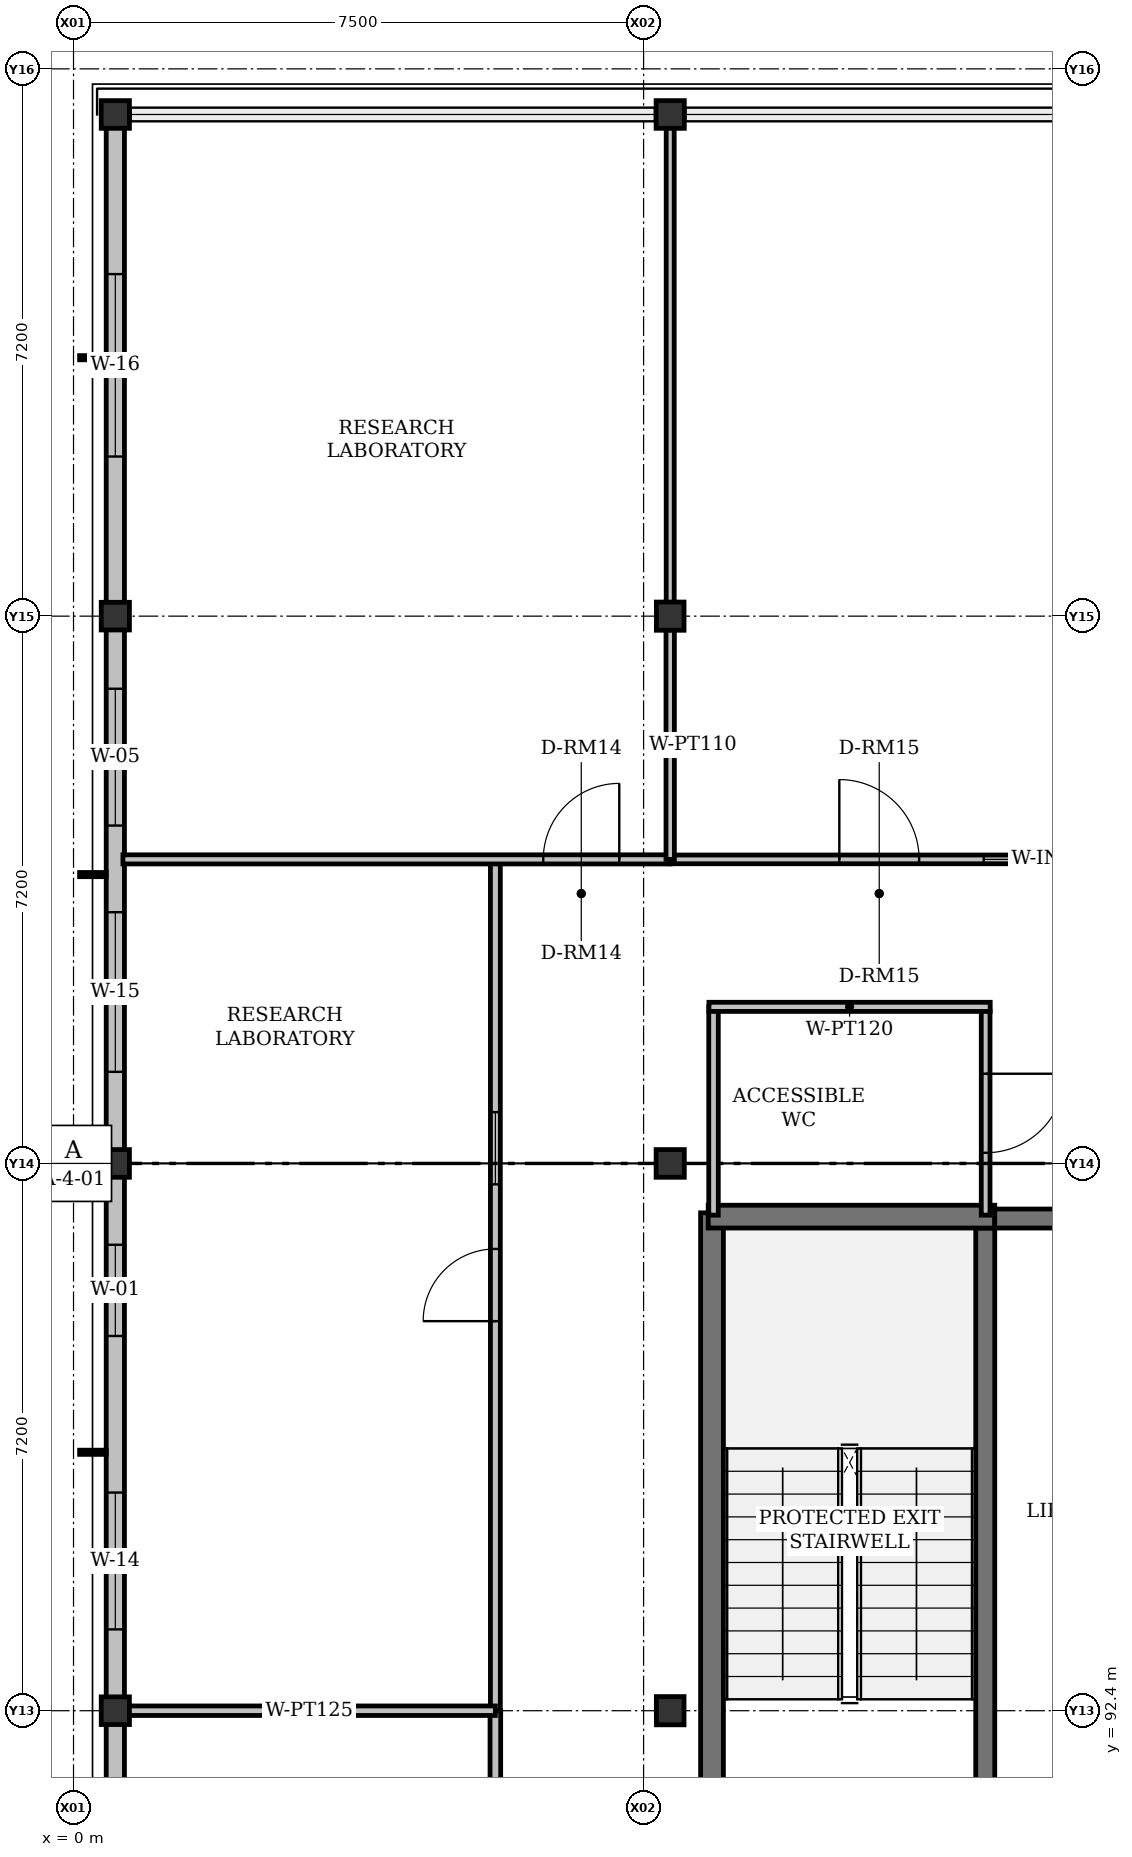
"""IFC4 building model, lengths in metres.
Left out: names, types, materials, properties, quantities, classifications, styles, units other than length and angle.
Written with IfcOpenShell. Run it as: python <this file> out.ifc"""

import sys

from ifc_helpers import new_model, si_unit, direction, frame, frame_2d, origin, origin_2d, place, context, subcontext, project, spatial, rectangle, i_section, extrude, element, fill, save


model = new_model("IFC4")
c1 = context("Model", 3, precision=1e-05, world=origin(), true_north=direction((0.0, 1.0)))
c2 = subcontext(c1, "Body", "Model", "MODEL_VIEW")
j1 = project(units=[si_unit("LENGTHUNIT", "METRE"), si_unit("PLANEANGLEUNIT", "RADIAN")], contexts=[c1])
p1 = place(None, origin())
s1 = spatial("IfcSite", under=j1, at=p1, CompositionType="ELEMENT")
p2 = place(p1, origin())
s2 = spatial("IfcBuilding", under=s1, at=p2, CompositionType="ELEMENT")
p3 = place(p2, frame((0.0, 0.0, 43.5)))
s3 = spatial("IfcBuildingStorey", under=s2, at=p3, CompositionType="ELEMENT", Elevation=43.5)
for number, where, z_axis, x_axis in (
    (1, (0.55, 92.4, 0.0), (0.0, 0.0, 1.0), (1.0, 0.0, 0.0)),
    (2, (7.85, 92.4, 0.0), (0.0, 0.0, 1.0), (0.0, 1.0, 0.0)),
    (3, (0.55, 99.6, 0.0), (0.0, 0.0, 1.0), (1.0, 0.0, 0.0)),
    (4, (7.85, 99.6, 0.0), (0.0, 0.0, 1.0), (1.0, 0.0, 0.0)),
    (5, (0.55, 106.8, 0.0), (0.0, 0.0, 1.0), (1.0, 0.0, 0.0)),
    (6, (7.85, 106.8, 0.0), (0.0, 0.0, 1.0), (0.0, 1.0, 0.0)),
    (7, (0.55, 113.4, 0.0), (0.0, 0.0, 1.0), (1.0, 0.0, 0.0)),
    (8, (7.85, 113.4, 0.0), (0.0, 0.0, 1.0), (1.0, 0.0, 0.0)),
):
    element("IfcColumn", number, at=place(p3, frame(where, z_axis=z_axis, x_axis=x_axis)), inside=s3, PredefinedType="COLUMN", context=c2, shape_type="SweptSolid", body=[
        extrude(i_section(OverallWidth=0.371, OverallDepth=0.364, WebThickness=0.013, FlangeThickness=0.022, FilletRadius=0.015, at=origin_2d()), origin(), (0.0, 0.0, 1.0), 4.2),
    ])
p4 = place(p3, frame((0.55, 85.2, 0.0), z_axis=(0.0, 0.0, 1.0), x_axis=(0.0, 1.0, 0.0)))
e9 = element("IfcWall", 9, at=p4, inside=s3, PredefinedType="SOLIDWALL", context=c2, shape_type="SweptSolid", body=[
    extrude(rectangle(XDim=7.2, YDim=0.24, at=frame_2d((3.6, 0.0))), origin(), (0.0, 0.0, 1.0), 3.552),
])
p5 = place(p4, frame((1.07, 0.0, 0.92)))
e10 = element("IfcOpeningElement", 10, at=p5, cuts=e9, PredefinedType="OPENING", context=c2, shape_type="SweptSolid", body=[
    extrude(rectangle(XDim=1.5, YDim=1.7, at=frame_2d((0.75, 0.85))), frame((0.0, 0.12, 0.0), z_axis=(0.0, -1.0, 0.0), x_axis=(1.0, 0.0, 0.0)), (0.0, 0.0, 1.0), 0.24),
])
p6 = place(p4, frame((4.13, 0.0, 0.92)))
e11 = element("IfcOpeningElement", 11, at=p6, cuts=e9, PredefinedType="OPENING", context=c2, shape_type="SweptSolid", body=[
    extrude(rectangle(XDim=2.0, YDim=1.35, at=frame_2d((1.0, 0.675))), frame((0.0, 0.12, 0.0), z_axis=(0.0, -1.0, 0.0), x_axis=(1.0, 0.0, 0.0)), (0.0, 0.0, 1.0), 0.24),
])
p7 = place(p3, frame((0.55, 92.4, 0.0), z_axis=(0.0, 0.0, 1.0), x_axis=(0.0, 1.0, 0.0)))
e12 = element("IfcWall", 12, at=p7, inside=s3, PredefinedType="SOLIDWALL", context=c2, shape_type="SweptSolid", body=[
    extrude(rectangle(XDim=7.2, YDim=0.24, at=frame_2d((3.6, 0.0))), origin(), (0.0, 0.0, 1.0), 3.552),
])
p8 = place(p7, frame((1.07, 0.0, 0.92)))
e13 = element("IfcOpeningElement", 13, at=p8, cuts=e12, PredefinedType="OPENING", context=c2, shape_type="SweptSolid", body=[
    extrude(rectangle(XDim=1.8, YDim=1.7, at=frame_2d((0.9, 0.85))), frame((0.0, 0.12, 0.0), z_axis=(0.0, -1.0, 0.0), x_axis=(1.0, 0.0, 0.0)), (0.0, 0.0, 1.0), 0.24),
])
p9 = place(p7, frame((4.93, 0.0, 0.92)))
e14 = element("IfcOpeningElement", 14, at=p9, cuts=e12, PredefinedType="OPENING", context=c2, shape_type="SweptSolid", body=[
    extrude(rectangle(XDim=1.2, YDim=1.4, at=frame_2d((0.6, 0.7))), frame((0.0, 0.12, 0.0), z_axis=(0.0, -1.0, 0.0), x_axis=(1.0, 0.0, 0.0)), (0.0, 0.0, 1.0), 0.24),
])
p10 = place(p3, frame((0.55, 99.6, 0.0), z_axis=(0.0, 0.0, 1.0), x_axis=(0.0, 1.0, 0.0)))
e15 = element("IfcWall", 15, at=p10, inside=s3, PredefinedType="SOLIDWALL", context=c2, shape_type="SweptSolid", body=[
    extrude(rectangle(XDim=7.2, YDim=0.24, at=frame_2d((3.6, 0.0))), origin(), (0.0, 0.0, 1.0), 3.552),
])
p11 = place(p10, frame((1.205, 0.0, 0.92)))
e16 = element("IfcOpeningElement", 16, at=p11, cuts=e15, PredefinedType="OPENING", context=c2, shape_type="SweptSolid", body=[
    extrude(rectangle(XDim=2.1, YDim=1.7, at=frame_2d((1.05, 0.85))), frame((0.0, 0.12, 0.0), z_axis=(0.0, -1.0, 0.0), x_axis=(1.0, 0.0, 0.0)), (0.0, 0.0, 1.0), 0.24),
])
p12 = place(p10, frame((4.445, 0.0, 0.92)))
e17 = element("IfcOpeningElement", 17, at=p12, cuts=e15, PredefinedType="OPENING", context=c2, shape_type="SweptSolid", body=[
    extrude(rectangle(XDim=1.8, YDim=1.4, at=frame_2d((0.9, 0.7))), frame((0.0, 0.12, 0.0), z_axis=(0.0, -1.0, 0.0), x_axis=(1.0, 0.0, 0.0)), (0.0, 0.0, 1.0), 0.24),
])
p13 = place(p3, frame((0.55, 106.8, 0.0), z_axis=(0.0, 0.0, 1.0), x_axis=(0.0, 1.0, 0.0)))
e18 = element("IfcWall", 18, at=p13, inside=s3, PredefinedType="SOLIDWALL", context=c2, shape_type="SweptSolid", body=[
    extrude(rectangle(XDim=6.6, YDim=0.24, at=frame_2d((3.3, 0.0))), origin(), (0.0, 0.0, 1.0), 3.552),
])
p14 = place(p13, frame((2.1, 0.0, 0.92)))
e19 = element("IfcOpeningElement", 19, at=p14, cuts=e18, PredefinedType="OPENING", context=c2, shape_type="SweptSolid", body=[
    extrude(rectangle(XDim=2.4, YDim=1.7, at=frame_2d((1.2, 0.85))), frame((0.0, 0.12, 0.0), z_axis=(0.0, -1.0, 0.0), x_axis=(1.0, 0.0, 0.0)), (0.0, 0.0, 1.0), 0.24),
])
p15 = place(p3, frame((8.4, 90.775, 0.0), z_axis=(0.0, 0.0, 1.0), x_axis=(0.0, 1.0, 0.0)))
e20 = element("IfcWall", 20, at=p15, inside=s3, PredefinedType="SHEAR", context=c2, shape_type="SweptSolid", body=[
    extrude(rectangle(XDim=8.175, YDim=0.3, at=frame_2d((4.087, 0.0))), origin(), (0.0, 0.0, 1.0), 4.2),
])
p16 = place(p3, frame((11.995, 90.9, 0.0), z_axis=(0.0, 0.0, 1.0), x_axis=(0.0, 1.0, 0.0)))
e21 = element("IfcWall", 21, at=p16, inside=s3, PredefinedType="SHEAR", context=c2, shape_type="SweptSolid", body=[
    extrude(rectangle(XDim=7.85, YDim=0.25, at=frame_2d((3.925, 0.0))), origin(), (0.0, 0.0, 1.0), 4.2),
])
p17 = place(p3, frame((8.35, 98.9, 0.0), z_axis=(0.0, 0.0, 1.0), x_axis=(1.0, 0.0, 0.0)))
e22 = element("IfcWall", 22, at=p17, inside=s3, PredefinedType="SHEAR", context=c2, shape_type="SweptSolid", body=[
    extrude(rectangle(XDim=3.77, YDim=0.3, at=frame_2d((1.885, 0.0))), origin(), (0.0, 0.0, 1.0), 4.2),
])
p18 = place(p3, frame((12.12, 98.875, 0.0), z_axis=(0.0, 0.0, 1.0), x_axis=(1.0, 0.0, 0.0)))
e23 = element("IfcWall", 23, at=p18, inside=s3, PredefinedType="SHEAR", context=c2, shape_type="SweptSolid", body=[
    extrude(rectangle(XDim=4.03, YDim=0.25, at=frame_2d((2.015, 0.0))), origin(), (0.0, 0.0, 1.0), 4.2),
])
p19 = place(p18, frame((1.35, 0.0, 0.0)))
e24 = element("IfcOpeningElement", 24, at=p19, cuts=e23, PredefinedType="OPENING", context=c2, shape_type="SweptSolid", body=[
    extrude(rectangle(XDim=1.3, YDim=2.2, at=frame_2d((0.65, 1.1))), frame((0.0, 0.125, 0.0), z_axis=(0.0, -1.0, 0.0), x_axis=(1.0, 0.0, 0.0)), (0.0, 0.0, 1.0), 0.25),
])
p20 = place(p3, frame((8.42, 98.92, 0.0), z_axis=(0.0, 0.0, 1.0), x_axis=(0.0, 1.0, 0.0)))
e25 = element("IfcWall", 25, at=p20, inside=s3, PredefinedType="PARTITIONING", context=c2, shape_type="SweptSolid", body=[
    extrude(rectangle(XDim=2.74, YDim=0.125, at=frame_2d((1.37, 0.0))), origin(), (0.0, 0.0, 1.0), 3.426),
])
p21 = place(p3, frame((8.36, 101.66, 0.0), z_axis=(0.0, 0.0, 1.0), x_axis=(1.0, 0.0, 0.0)))
e26 = element("IfcWall", 26, at=p21, inside=s3, PredefinedType="PARTITIONING", context=c2, shape_type="SweptSolid", body=[
    extrude(rectangle(XDim=3.7, YDim=0.12, at=frame_2d((1.85, 0.0))), origin(), (0.0, 0.0, 1.0), 3.95),
])
p22 = place(p3, frame((12.0, 101.6, 0.0), z_axis=(0.0, 0.0, 1.0), x_axis=(0.0, -1.0, 0.0)))
e27 = element("IfcWall", 27, at=p22, inside=s3, PredefinedType="PARTITIONING", context=c2, shape_type="SweptSolid", body=[
    extrude(rectangle(XDim=2.68, YDim=0.115, at=frame_2d((1.34, 0.0))), origin(), (0.0, 0.0, 1.0), 3.426),
])
p23 = place(p22, frame((0.82, 0.0, 0.0)))
e28 = element("IfcOpeningElement", 28, at=p23, cuts=e27, PredefinedType="OPENING", context=c2, shape_type="SweptSolid", body=[
    extrude(rectangle(XDim=1.04, YDim=2.15, at=frame_2d((0.52, 1.075))), frame((0.0, 0.058, 0.0), z_axis=(0.0, -1.0, 0.0), x_axis=(1.0, 0.0, 0.0)), (0.0, 0.0, 1.0), 0.115),
])
p24 = place(p3, frame((5.55, 70.625, 0.0), z_axis=(0.0, 0.0, 1.0), x_axis=(0.0, 1.0, 0.0)))
e29 = element("IfcWall", 29, at=p24, inside=s3, PredefinedType="PARTITIONING", context=c2, shape_type="SweptSolid", body=[
    extrude(rectangle(XDim=21.775, YDim=0.14, at=frame_2d((10.887, 0.0))), origin(), (0.0, 0.0, 1.0), 3.426),
])
p25 = place(p24, frame((10.265, 0.0, 0.0)))
e30 = element("IfcOpeningElement", 30, at=p25, cuts=e29, PredefinedType="OPENING", context=c2, shape_type="SweptSolid", body=[
    extrude(rectangle(XDim=1.12, YDim=2.15, at=frame_2d((0.56, 1.075))), frame((0.0, 0.07, 0.0), z_axis=(0.0, -1.0, 0.0), x_axis=(1.0, 0.0, 0.0)), (0.0, 0.0, 1.0), 0.14),
])
p26 = place(p24, frame((12.235, 0.0, 0.92)))
e31 = element("IfcOpeningElement", 31, at=p26, cuts=e29, PredefinedType="OPENING", context=c2, shape_type="SweptSolid", body=[
    extrude(rectangle(XDim=0.85, YDim=1.1, at=frame_2d((0.425, 0.55))), frame((0.0, 0.07, 0.0), z_axis=(0.0, -1.0, 0.0), x_axis=(1.0, 0.0, 0.0)), (0.0, 0.0, 1.0), 0.14),
])
p27 = place(p3, frame((5.55, 92.4, 0.0), z_axis=(0.0, 0.0, 1.0), x_axis=(0.0, 1.0, 0.0)))
e32 = element("IfcWall", 32, at=p27, inside=s3, PredefinedType="PARTITIONING", context=c2, shape_type="SweptSolid", body=[
    extrude(rectangle(XDim=11.2, YDim=0.13, at=frame_2d((5.6, 0.0))), origin(), (0.0, 0.0, 1.0), 3.426),
])
p28 = place(p27, frame((5.125, 0.0, 0.0)))
e33 = element("IfcOpeningElement", 33, at=p28, cuts=e32, PredefinedType="OPENING", context=c2, shape_type="SweptSolid", body=[
    extrude(rectangle(XDim=0.95, YDim=2.2, at=frame_2d((0.475, 1.1))), frame((0.0, 0.065, 0.0), z_axis=(0.0, -1.0, 0.0), x_axis=(1.0, 0.0, 0.0)), (0.0, 0.0, 1.0), 0.13),
])
p29 = place(p27, frame((6.925, 0.0, 0.92)))
e34 = element("IfcOpeningElement", 34, at=p29, cuts=e32, PredefinedType="OPENING", context=c2, shape_type="SweptSolid", body=[
    extrude(rectangle(XDim=0.95, YDim=1.1, at=frame_2d((0.475, 0.55))), frame((0.0, 0.065, 0.0), z_axis=(0.0, -1.0, 0.0), x_axis=(1.0, 0.0, 0.0)), (0.0, 0.0, 1.0), 0.13),
])
p30 = place(p3, frame((0.65, 92.4, 0.0), z_axis=(0.0, 0.0, 1.0), x_axis=(1.0, 0.0, 0.0)))
e35 = element("IfcWall", 35, at=p30, inside=s3, PredefinedType="PARTITIONING", context=c2, shape_type="SweptSolid", body=[
    extrude(rectangle(XDim=4.9, YDim=0.125, at=frame_2d((2.45, 0.0))), origin(), (0.0, 0.0, 1.0), 3.426),
])
p31 = place(p3, frame((0.65, 103.6, 0.0), z_axis=(0.0, 0.0, 1.0), x_axis=(1.0, 0.0, 0.0)))
e36 = element("IfcWall", 36, at=p31, inside=s3, PredefinedType="PARTITIONING", context=c2, shape_type="SweptSolid", body=[
    extrude(rectangle(XDim=7.2, YDim=0.12, at=frame_2d((3.6, 0.0))), origin(), (0.0, 0.0, 1.0), 3.502),
])
p32 = place(p31, frame((5.53, 0.0, 0.0)))
e37 = element("IfcOpeningElement", 37, at=p32, cuts=e36, PredefinedType="OPENING", context=c2, shape_type="SweptSolid", body=[
    extrude(rectangle(XDim=1.0, YDim=2.2, at=frame_2d((0.5, 1.1))), frame((0.0, 0.06, 0.0), z_axis=(0.0, -1.0, 0.0), x_axis=(1.0, 0.0, 0.0)), (0.0, 0.0, 1.0), 0.12),
])
p33 = place(p3, frame((7.85, 103.6, 0.0), z_axis=(0.0, 0.0, 1.0), x_axis=(1.0, 0.0, 0.0)))
e38 = element("IfcWall", 38, at=p33, inside=s3, PredefinedType="PARTITIONING", context=c2, shape_type="SweptSolid", body=[
    extrude(rectangle(XDim=18.315, YDim=0.115, at=frame_2d((9.157, 0.0))), origin(), (0.0, 0.0, 1.0), 3.502),
])
p34 = place(p33, frame((2.225, 0.0, 0.0)))
e39 = element("IfcOpeningElement", 39, at=p34, cuts=e38, PredefinedType="OPENING", context=c2, shape_type="SweptSolid", body=[
    extrude(rectangle(XDim=1.05, YDim=2.2, at=frame_2d((0.525, 1.1))), frame((0.0, 0.058, 0.0), z_axis=(0.0, -1.0, 0.0), x_axis=(1.0, 0.0, 0.0)), (0.0, 0.0, 1.0), 0.115),
])
p35 = place(p33, frame((4.125, 0.0, 0.92)))
e40 = element("IfcOpeningElement", 40, at=p35, cuts=e38, PredefinedType="OPENING", context=c2, shape_type="SweptSolid", body=[
    extrude(rectangle(XDim=1.1, YDim=1.1, at=frame_2d((0.55, 0.55))), frame((0.0, 0.058, 0.0), z_axis=(0.0, -1.0, 0.0), x_axis=(1.0, 0.0, 0.0)), (0.0, 0.0, 1.0), 0.115),
])
p36 = place(p3, frame((7.85, 106.619, 0.0), z_axis=(0.0, 0.0, 1.0), x_axis=(0.0, -1.0, 0.0)))
e41 = element("IfcWall", 41, at=p36, inside=s3, PredefinedType="PARTITIONING", context=c2, shape_type="SweptSolid", body=[
    extrude(rectangle(XDim=3.019, YDim=0.11, at=frame_2d((1.51, 0.0))), origin(), (0.0, 0.0, 1.0), 3.502),
])
p37 = place(p3, frame((7.85, 113.35, 0.0), z_axis=(0.0, 0.0, 1.0), x_axis=(0.0, -1.0, 0.0)))
e42 = element("IfcWall", 42, at=p37, inside=s3, PredefinedType="PARTITIONING", context=c2, shape_type="SweptSolid", body=[
    extrude(rectangle(XDim=6.37, YDim=0.105, at=frame_2d((3.185, 0.0))), origin(), (0.0, 0.0, 1.0), 3.502),
])
p38 = place(p8, origin())
e43 = element("IfcWindow", 43, at=p38, inside=s3, PartitioningType="DOUBLE_PANEL_VERTICAL", PredefinedType="WINDOW", context=c2, shape_type="SweptSolid", body=[
    extrude(rectangle(XDim=1.8, YDim=1.7, at=frame_2d((0.9, 0.85))), frame((0.0, 0.03, 0.0), z_axis=(0.0, -1.0, 0.0), x_axis=(1.0, 0.0, 0.0)), (0.0, 0.0, 1.0), 0.06),
])
fill(e13, e43)
p39 = place(p9, origin())
e44 = element("IfcWindow", 44, at=p39, inside=s3, PartitioningType="SINGLE_PANEL", PredefinedType="WINDOW", context=c2, shape_type="SweptSolid", body=[
    extrude(rectangle(XDim=1.2, YDim=1.4, at=frame_2d((0.6, 0.7))), frame((0.0, 0.03, 0.0), z_axis=(0.0, -1.0, 0.0), x_axis=(1.0, 0.0, 0.0)), (0.0, 0.0, 1.0), 0.06),
])
fill(e14, e44)
p40 = place(p11, origin())
e45 = element("IfcWindow", 45, at=p40, inside=s3, PartitioningType="DOUBLE_PANEL_VERTICAL", PredefinedType="WINDOW", context=c2, shape_type="SweptSolid", body=[
    extrude(rectangle(XDim=2.1, YDim=1.7, at=frame_2d((1.05, 0.85))), frame((0.0, 0.03, 0.0), z_axis=(0.0, -1.0, 0.0), x_axis=(1.0, 0.0, 0.0)), (0.0, 0.0, 1.0), 0.06),
])
fill(e16, e45)
p41 = place(p12, origin())
e46 = element("IfcWindow", 46, at=p41, inside=s3, PartitioningType="DOUBLE_PANEL_VERTICAL", PredefinedType="WINDOW", context=c2, shape_type="SweptSolid", body=[
    extrude(rectangle(XDim=1.8, YDim=1.4, at=frame_2d((0.9, 0.7))), frame((0.0, 0.03, 0.0), z_axis=(0.0, -1.0, 0.0), x_axis=(1.0, 0.0, 0.0)), (0.0, 0.0, 1.0), 0.06),
])
fill(e17, e46)
p42 = place(p14, origin())
e47 = element("IfcWindow", 47, at=p42, inside=s3, PartitioningType="DOUBLE_PANEL_VERTICAL", PredefinedType="WINDOW", context=c2, shape_type="SweptSolid", body=[
    extrude(rectangle(XDim=2.4, YDim=1.7, at=frame_2d((1.2, 0.85))), frame((0.0, 0.03, 0.0), z_axis=(0.0, -1.0, 0.0), x_axis=(1.0, 0.0, 0.0)), (0.0, 0.0, 1.0), 0.06),
])
fill(e19, e47)
p43 = place(p23, origin())
e48 = element("IfcDoor", 48, at=p43, inside=s3, OperationType="SINGLE_SWING_LEFT", PredefinedType="DOOR", context=c2, shape_type="SweptSolid", body=[
    extrude(rectangle(XDim=1.04, YDim=2.15, at=frame_2d((0.52, 1.075))), frame((0.0, 0.025, 0.0), z_axis=(0.0, -1.0, 0.0), x_axis=(1.0, 0.0, 0.0)), (0.0, 0.0, 1.0), 0.05),
])
fill(e28, e48)
p44 = place(p28, origin())
e49 = element("IfcDoor", 49, at=p44, inside=s3, OperationType="SINGLE_SWING_LEFT", PredefinedType="DOOR", context=c2, shape_type="SweptSolid", body=[
    extrude(rectangle(XDim=0.95, YDim=2.2, at=frame_2d((0.475, 1.1))), frame((0.0, 0.025, 0.0), z_axis=(0.0, -1.0, 0.0), x_axis=(1.0, 0.0, 0.0)), (0.0, 0.0, 1.0), 0.05),
])
fill(e33, e49)
p45 = place(p29, origin())
e50 = element("IfcWindow", 50, at=p45, inside=s3, PartitioningType="SINGLE_PANEL", PredefinedType="WINDOW", context=c2, shape_type="SweptSolid", body=[
    extrude(rectangle(XDim=0.95, YDim=1.1, at=frame_2d((0.475, 0.55))), frame((0.0, 0.03, 0.0), z_axis=(0.0, -1.0, 0.0), x_axis=(1.0, 0.0, 0.0)), (0.0, 0.0, 1.0), 0.06),
])
fill(e34, e50)
p46 = place(p32, origin())
e51 = element("IfcDoor", 51, at=p46, inside=s3, OperationType="SINGLE_SWING_RIGHT", PredefinedType="DOOR", context=c2, shape_type="SweptSolid", body=[
    extrude(rectangle(XDim=1.0, YDim=2.2, at=frame_2d((0.5, 1.1))), frame((0.0, 0.025, 0.0), z_axis=(0.0, -1.0, 0.0), x_axis=(1.0, 0.0, 0.0)), (0.0, 0.0, 1.0), 0.05),
])
fill(e37, e51)
p47 = place(p34, origin())
e52 = element("IfcDoor", 52, at=p47, inside=s3, OperationType="SINGLE_SWING_LEFT", PredefinedType="DOOR", context=c2, shape_type="SweptSolid", body=[
    extrude(rectangle(XDim=1.05, YDim=2.2, at=frame_2d((0.525, 1.1))), frame((0.0, 0.025, 0.0), z_axis=(0.0, -1.0, 0.0), x_axis=(1.0, 0.0, 0.0)), (0.0, 0.0, 1.0), 0.05),
])
fill(e39, e52)
p48 = place(p35, origin())
e53 = element("IfcWindow", 53, at=p48, inside=s3, PartitioningType="SINGLE_PANEL", PredefinedType="WINDOW", context=c2, shape_type="SweptSolid", body=[
    extrude(rectangle(XDim=1.1, YDim=1.1, at=frame_2d((0.55, 0.55))), frame((0.0, 0.03, 0.0), z_axis=(0.0, -1.0, 0.0), x_axis=(1.0, 0.0, 0.0)), (0.0, 0.0, 1.0), 0.06),
])
fill(e40, e53)
save(model, sys.argv[1])
